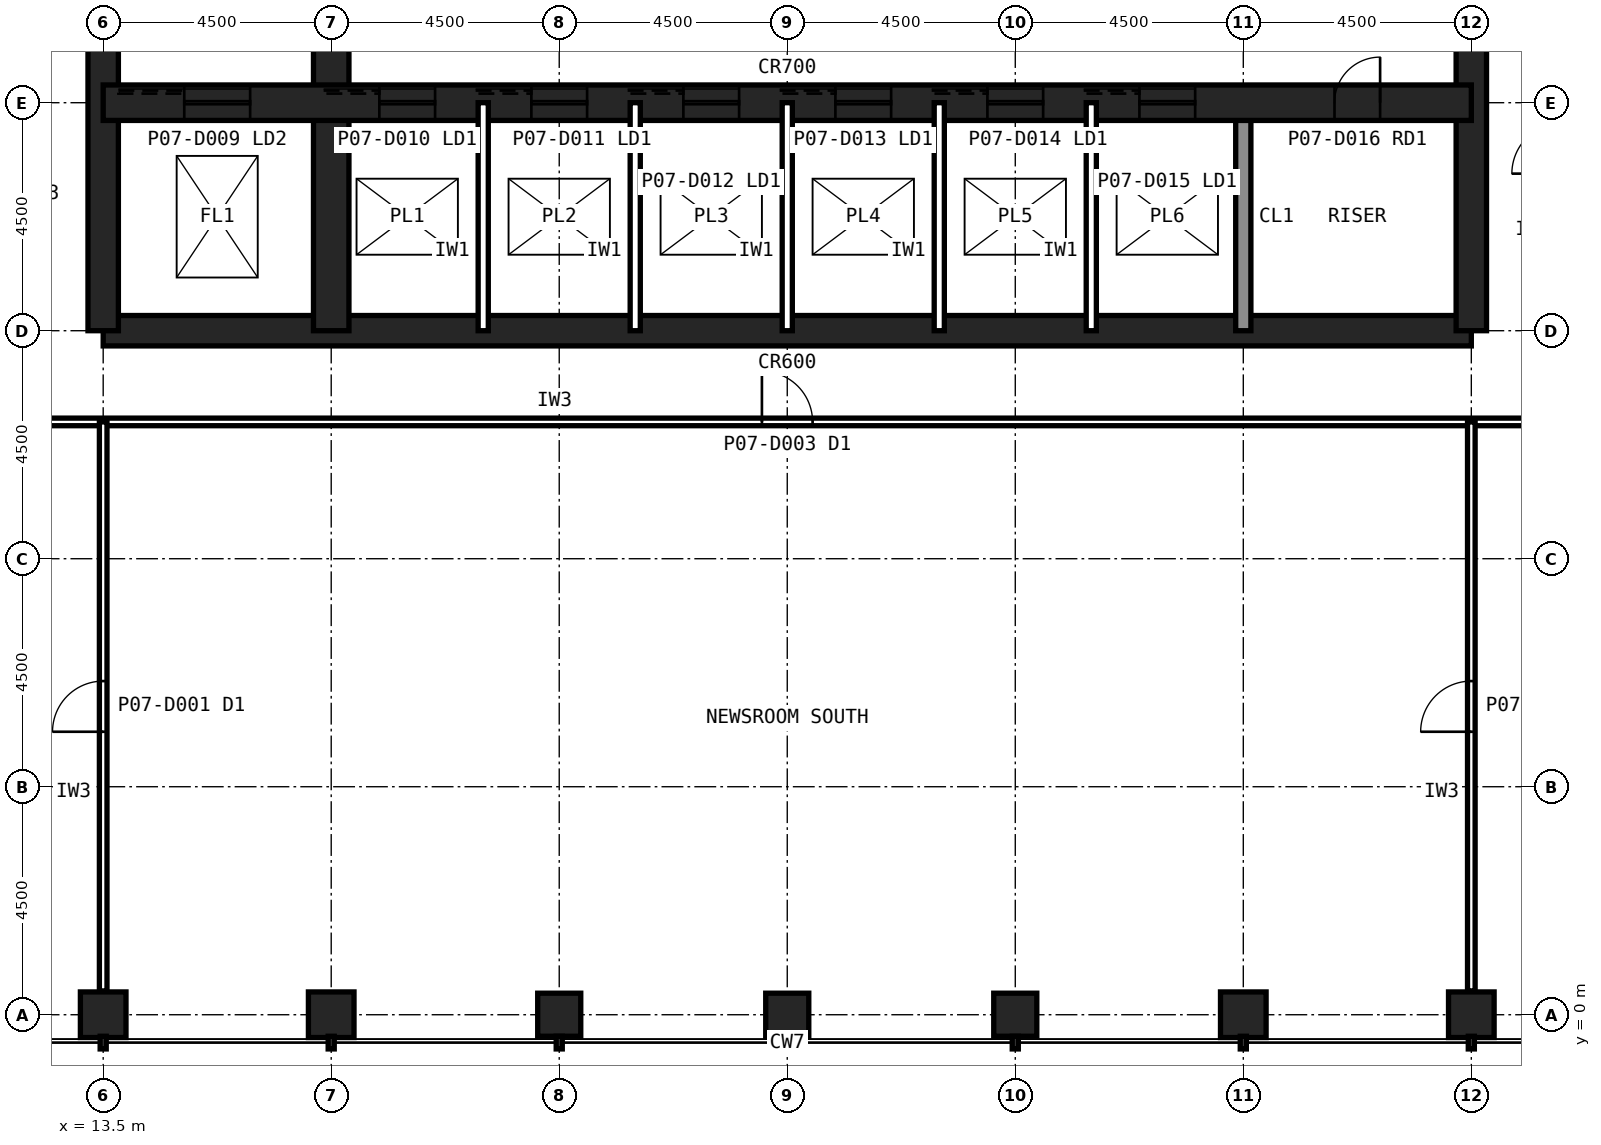
"""IFC4 building model, lengths in metres.
Left out: names, types, materials, properties, quantities, classifications, styles, units other than length and angle.
Written with IfcOpenShell. Run it as: python <this file> out.ifc"""

import sys

from ifc_helpers import new_model, si_unit, direction, frame, frame_2d, origin, origin_2d, place, context, subcontext, project, spatial, rectangle, hollow_rectangle, extrude, element, fill, save


model = new_model("IFC4")
c1 = context("Model", 3, precision=1e-05, world=origin(), true_north=direction((0.0, 1.0)))
c2 = subcontext(c1, "Body", "Model", "MODEL_VIEW")
j1 = project(units=[si_unit("LENGTHUNIT", "METRE"), si_unit("PLANEANGLEUNIT", "RADIAN")], contexts=[c1])
p1 = place(None, origin())
s1 = spatial("IfcSite", under=j1, at=p1, CompositionType="ELEMENT")
p2 = place(p1, origin())
s2 = spatial("IfcBuilding", under=s1, at=p2, CompositionType="ELEMENT")
p3 = place(p2, frame((0.0, 0.0, 33.2)))
s3 = spatial("IfcBuildingStorey", under=s2, at=p3, CompositionType="ELEMENT", Elevation=33.2)
for number, where, z_axis, x_axis in (
    (1, (13.5, 0.0, 0.0), (0.0, 0.0, 1.0), (1.0, 0.0, 0.0)),
    (2, (18.0, 0.0, 0.0), (0.0, 0.0, 1.0), (1.0, 0.0, 0.0)),
):
    element("IfcColumn", number, at=place(p3, frame(where, z_axis=z_axis, x_axis=x_axis)), inside=s3, PredefinedType="COLUMN", context=c2, shape_type="SweptSolid", body=[
        extrude(hollow_rectangle(XDim=0.9, YDim=0.9, WallThickness=0.063, at=origin_2d()), origin(), (0.0, 0.0, 1.0), 4.2),
    ])
for number, where, z_axis, x_axis in (
    (3, (22.5, 0.0, 0.0), (0.0, 0.0, 1.0), (1.0, 0.0, 0.0)),
    (4, (27.0, 0.0, 0.0), (0.0, 0.0, 1.0), (1.0, 0.0, 0.0)),
    (5, (31.5, 0.0, 0.0), (0.0, 0.0, 1.0), (1.0, 0.0, 0.0)),
):
    element("IfcColumn", number, at=place(p3, frame(where, z_axis=z_axis, x_axis=x_axis)), inside=s3, PredefinedType="COLUMN", context=c2, shape_type="SweptSolid", body=[
        extrude(hollow_rectangle(XDim=0.85, YDim=0.85, WallThickness=0.05, at=origin_2d()), origin(), (0.0, 0.0, 1.0), 4.2),
    ])
for number, where, z_axis, x_axis in (
    (6, (36.0, 0.0, 0.0), (0.0, 0.0, 1.0), (1.0, 0.0, 0.0)),
    (7, (40.5, 0.0, 0.0), (0.0, 0.0, 1.0), (1.0, 0.0, 0.0)),
):
    element("IfcColumn", number, at=place(p3, frame(where, z_axis=z_axis, x_axis=x_axis)), inside=s3, PredefinedType="COLUMN", context=c2, shape_type="SweptSolid", body=[
        extrude(hollow_rectangle(XDim=0.9, YDim=0.9, WallThickness=0.063, at=origin_2d()), origin(), (0.0, 0.0, 1.0), 4.2),
    ])
p4 = place(p3, frame((13.5, 13.5, 0.0), z_axis=(0.0, 0.0, 1.0), x_axis=(1.0, 0.0, 0.0)))
e8 = element("IfcWall", 8, at=p4, inside=s3, PredefinedType="SHEAR", context=c2, shape_type="SweptSolid", body=[
    extrude(rectangle(XDim=27.0, YDim=0.6, at=frame_2d((13.5, 0.0))), origin(), (0.0, 0.0, 1.0), 4.2),
])
p5 = place(p3, frame((40.5, 13.5, 0.0), z_axis=(0.0, 0.0, 1.0), x_axis=(0.0, 1.0, 0.0)))
e9 = element("IfcWall", 9, at=p5, inside=s3, PredefinedType="SHEAR", context=c2, shape_type="SweptSolid", body=[
    extrude(rectangle(XDim=27.0, YDim=0.6, at=frame_2d((13.5, 0.0))), origin(), (0.0, 0.0, 1.0), 4.2),
])
p6 = place(p5, frame((5.85, 0.0, 0.0)))
e10 = element("IfcOpeningElement", 10, at=p6, cuts=e9, PredefinedType="OPENING", context=c2, shape_type="SweptSolid", body=[
    extrude(rectangle(XDim=1.8, YDim=2.1, at=frame_2d((0.9, 1.05))), frame((0.0, 0.31, 0.0), z_axis=(0.0, -1.0, 0.0), x_axis=(1.0, 0.0, 0.0)), (0.0, 0.0, 1.0), 0.62),
])
p7 = place(p5, frame((19.65, 0.0, 0.0)))
e11 = element("IfcOpeningElement", 11, at=p7, cuts=e9, PredefinedType="OPENING", context=c2, shape_type="SweptSolid", body=[
    extrude(rectangle(XDim=1.2, YDim=2.1, at=frame_2d((0.6, 1.05))), frame((0.0, 0.31, 0.0), z_axis=(0.0, -1.0, 0.0), x_axis=(1.0, 0.0, 0.0)), (0.0, 0.0, 1.0), 0.62),
])
p8 = place(p3, frame((13.5, 40.5, 0.0), z_axis=(0.0, 0.0, 1.0), x_axis=(0.0, -1.0, 0.0)))
e12 = element("IfcWall", 12, at=p8, inside=s3, PredefinedType="SHEAR", context=c2, shape_type="SweptSolid", body=[
    extrude(rectangle(XDim=27.0, YDim=0.6, at=frame_2d((13.5, 0.0))), origin(), (0.0, 0.0, 1.0), 4.2),
])
p9 = place(p8, frame((19.65, 0.0, 0.0)))
e13 = element("IfcOpeningElement", 13, at=p9, cuts=e12, PredefinedType="OPENING", context=c2, shape_type="SweptSolid", body=[
    extrude(rectangle(XDim=1.2, YDim=2.1, at=frame_2d((0.6, 1.05))), frame((0.0, 0.31, 0.0), z_axis=(0.0, -1.0, 0.0), x_axis=(1.0, 0.0, 0.0)), (0.0, 0.0, 1.0), 0.62),
])
p10 = place(p8, frame((5.85, 0.0, 0.0)))
e14 = element("IfcOpeningElement", 14, at=p10, cuts=e12, PredefinedType="OPENING", context=c2, shape_type="SweptSolid", body=[
    extrude(rectangle(XDim=1.8, YDim=2.1, at=frame_2d((0.9, 1.05))), frame((0.0, 0.31, 0.0), z_axis=(0.0, -1.0, 0.0), x_axis=(1.0, 0.0, 0.0)), (0.0, 0.0, 1.0), 0.62),
])
p11 = place(p3, frame((18.0, 13.5, 0.0), z_axis=(0.0, 0.0, 1.0), x_axis=(0.0, 1.0, 0.0)))
e15 = element("IfcWall", 15, at=p11, inside=s3, PredefinedType="SHEAR", context=c2, shape_type="SweptSolid", body=[
    extrude(rectangle(XDim=18.0, YDim=0.7, at=frame_2d((9.0, 0.0))), origin(), (0.0, 0.0, 1.0), 4.2),
])
p12 = place(p3, frame((36.0, 13.5, 0.0), z_axis=(0.0, 0.0, 1.0), x_axis=(0.0, 1.0, 0.0)))
e16 = element("IfcWall", 16, at=p12, inside=s3, PredefinedType="SOLIDWALL", context=c2, shape_type="SweptSolid", body=[
    extrude(rectangle(XDim=4.5, YDim=0.3, at=frame_2d((2.25, 0.0))), origin(), (0.0, 0.0, 1.0), 4.04),
])
p13 = place(p3, frame((13.5, 18.0, 0.0), z_axis=(0.0, 0.0, 1.0), x_axis=(1.0, 0.0, 0.0)))
e17 = element("IfcWall", 17, at=p13, inside=s3, PredefinedType="SHEAR", context=c2, shape_type="SweptSolid", body=[
    extrude(rectangle(XDim=27.0, YDim=0.7, at=frame_2d((13.5, 0.0))), origin(), (0.0, 0.0, 1.0), 4.2),
])
p14 = place(p13, frame((24.3, 0.0, 0.0)))
e18 = element("IfcOpeningElement", 18, at=p14, cuts=e17, PredefinedType="OPENING", context=c2, shape_type="SweptSolid", body=[
    extrude(rectangle(XDim=0.9, YDim=2.1, at=frame_2d((0.45, 1.05))), frame((0.0, 0.36, 0.0), z_axis=(0.0, -1.0, 0.0), x_axis=(1.0, 0.0, 0.0)), (0.0, 0.0, 1.0), 0.72),
])
p15 = place(p13, frame((5.45, 0.0, 0.0)))
e19 = element("IfcOpeningElement", 19, at=p15, cuts=e17, PredefinedType="OPENING", context=c2, shape_type="SweptSolid", body=[
    extrude(rectangle(XDim=1.1, YDim=2.1, at=frame_2d((0.55, 1.05))), frame((0.0, 0.36, 0.0), z_axis=(0.0, -1.0, 0.0), x_axis=(1.0, 0.0, 0.0)), (0.0, 0.0, 1.0), 0.72),
])
p16 = place(p13, frame((8.45, 0.0, 0.0)))
e20 = element("IfcOpeningElement", 20, at=p16, cuts=e17, PredefinedType="OPENING", context=c2, shape_type="SweptSolid", body=[
    extrude(rectangle(XDim=1.1, YDim=2.1, at=frame_2d((0.55, 1.05))), frame((0.0, 0.36, 0.0), z_axis=(0.0, -1.0, 0.0), x_axis=(1.0, 0.0, 0.0)), (0.0, 0.0, 1.0), 0.72),
])
p17 = place(p13, frame((11.45, 0.0, 0.0)))
e21 = element("IfcOpeningElement", 21, at=p17, cuts=e17, PredefinedType="OPENING", context=c2, shape_type="SweptSolid", body=[
    extrude(rectangle(XDim=1.1, YDim=2.1, at=frame_2d((0.55, 1.05))), frame((0.0, 0.36, 0.0), z_axis=(0.0, -1.0, 0.0), x_axis=(1.0, 0.0, 0.0)), (0.0, 0.0, 1.0), 0.72),
])
p18 = place(p13, frame((14.45, 0.0, 0.0)))
e22 = element("IfcOpeningElement", 22, at=p18, cuts=e17, PredefinedType="OPENING", context=c2, shape_type="SweptSolid", body=[
    extrude(rectangle(XDim=1.1, YDim=2.1, at=frame_2d((0.55, 1.05))), frame((0.0, 0.36, 0.0), z_axis=(0.0, -1.0, 0.0), x_axis=(1.0, 0.0, 0.0)), (0.0, 0.0, 1.0), 0.72),
])
p19 = place(p13, frame((17.45, 0.0, 0.0)))
e23 = element("IfcOpeningElement", 23, at=p19, cuts=e17, PredefinedType="OPENING", context=c2, shape_type="SweptSolid", body=[
    extrude(rectangle(XDim=1.1, YDim=2.1, at=frame_2d((0.55, 1.05))), frame((0.0, 0.36, 0.0), z_axis=(0.0, -1.0, 0.0), x_axis=(1.0, 0.0, 0.0)), (0.0, 0.0, 1.0), 0.72),
])
p20 = place(p13, frame((20.45, 0.0, 0.0)))
e24 = element("IfcOpeningElement", 24, at=p20, cuts=e17, PredefinedType="OPENING", context=c2, shape_type="SweptSolid", body=[
    extrude(rectangle(XDim=1.1, YDim=2.1, at=frame_2d((0.55, 1.05))), frame((0.0, 0.36, 0.0), z_axis=(0.0, -1.0, 0.0), x_axis=(1.0, 0.0, 0.0)), (0.0, 0.0, 1.0), 0.72),
])
p21 = place(p13, frame((1.6, 0.0, 0.0)))
e25 = element("IfcOpeningElement", 25, at=p21, cuts=e17, PredefinedType="OPENING", context=c2, shape_type="SweptSolid", body=[
    extrude(rectangle(XDim=1.3, YDim=2.2, at=frame_2d((0.65, 1.1))), frame((0.0, 0.36, 0.0), z_axis=(0.0, -1.0, 0.0), x_axis=(1.0, 0.0, 0.0)), (0.0, 0.0, 1.0), 0.72),
])
for number, where, z_axis, x_axis in (
    (26, (21.0, 13.5, 0.0), (0.0, 0.0, 1.0), (0.0, 1.0, 0.0)),
    (27, (24.0, 13.5, 0.0), (0.0, 0.0, 1.0), (0.0, 1.0, 0.0)),
    (28, (27.0, 13.5, 0.0), (0.0, 0.0, 1.0), (0.0, 1.0, 0.0)),
    (29, (30.0, 13.5, 0.0), (0.0, 0.0, 1.0), (0.0, 1.0, 0.0)),
    (30, (33.0, 13.5, 0.0), (0.0, 0.0, 1.0), (0.0, 1.0, 0.0)),
):
    element("IfcWall", number, at=place(p3, frame(where, z_axis=z_axis, x_axis=x_axis)), inside=s3, PredefinedType="PARTITIONING", context=c2, shape_type="SweptSolid", body=[
        extrude(rectangle(XDim=4.5, YDim=0.2, at=frame_2d((2.25, 0.0))), origin(), (0.0, 0.0, 1.0), 4.04),
    ])
p22 = place(p3, frame((11.7, 11.7, 0.0), z_axis=(0.0, 0.0, 1.0), x_axis=(1.0, 0.0, 0.0)))
e31 = element("IfcWall", 31, at=p22, inside=s3, PredefinedType="PARTITIONING", context=c2, shape_type="SweptSolid", body=[
    extrude(rectangle(XDim=30.6, YDim=0.15, at=frame_2d((15.3, 0.0))), origin(), (0.0, 0.0, 1.0), 4.04),
])
p23 = place(p22, frame((14.8, 0.0, 0.0)))
e32 = element("IfcOpeningElement", 32, at=p23, cuts=e31, PredefinedType="OPENING", context=c2, shape_type="SweptSolid", body=[
    extrude(rectangle(XDim=1.0, YDim=2.1, at=frame_2d((0.5, 1.05))), frame((0.0, 0.085, 0.0), z_axis=(0.0, -1.0, 0.0), x_axis=(1.0, 0.0, 0.0)), (0.0, 0.0, 1.0), 0.17),
])
p24 = place(p3, frame((40.5, 0.47, 0.0), z_axis=(0.0, 0.0, 1.0), x_axis=(0.0, 1.0, 0.0)))
e33 = element("IfcWall", 33, at=p24, inside=s3, PredefinedType="PARTITIONING", context=c2, shape_type="SweptSolid", body=[
    extrude(rectangle(XDim=11.23, YDim=0.15, at=frame_2d((5.615, 0.0))), origin(), (0.0, 0.0, 1.0), 3.189),
])
p25 = place(p24, frame((5.115, 0.0, 0.0)))
e34 = element("IfcOpeningElement", 34, at=p25, cuts=e33, PredefinedType="OPENING", context=c2, shape_type="SweptSolid", body=[
    extrude(rectangle(XDim=1.0, YDim=2.1, at=frame_2d((0.5, 1.05))), frame((0.0, 0.085, 0.0), z_axis=(0.0, -1.0, 0.0), x_axis=(1.0, 0.0, 0.0)), (0.0, 0.0, 1.0), 0.17),
])
p26 = place(p3, frame((13.5, 0.47, 0.0), z_axis=(0.0, 0.0, 1.0), x_axis=(0.0, 1.0, 0.0)))
e35 = element("IfcWall", 35, at=p26, inside=s3, PredefinedType="PARTITIONING", context=c2, shape_type="SweptSolid", body=[
    extrude(rectangle(XDim=11.23, YDim=0.15, at=frame_2d((5.615, 0.0))), origin(), (0.0, 0.0, 1.0), 3.189),
])
p27 = place(p26, frame((5.115, 0.0, 0.0)))
e36 = element("IfcOpeningElement", 36, at=p27, cuts=e35, PredefinedType="OPENING", context=c2, shape_type="SweptSolid", body=[
    extrude(rectangle(XDim=1.0, YDim=2.1, at=frame_2d((0.5, 1.05))), frame((0.0, 0.085, 0.0), z_axis=(0.0, -1.0, 0.0), x_axis=(1.0, 0.0, 0.0)), (0.0, 0.0, 1.0), 0.17),
])
p28 = place(p14, origin())
e37 = element("IfcDoor", 37, at=p28, inside=s3, OperationType="SINGLE_SWING_RIGHT", PredefinedType="DOOR", context=c2, shape_type="SweptSolid", body=[
    extrude(rectangle(XDim=0.9, YDim=2.1, at=frame_2d((0.45, 1.05))), frame((0.0, 0.025, 0.0), z_axis=(0.0, -1.0, 0.0), x_axis=(1.0, 0.0, 0.0)), (0.0, 0.0, 1.0), 0.05),
])
fill(e18, e37)
p29 = place(p15, origin())
e38 = element("IfcDoor", 38, at=p29, inside=s3, OperationType="SLIDING_TO_LEFT", PredefinedType="DOOR", context=c2, shape_type="SweptSolid", body=[
    extrude(rectangle(XDim=1.1, YDim=2.1, at=frame_2d((0.55, 1.05))), frame((0.0, 0.025, 0.0), z_axis=(0.0, -1.0, 0.0), x_axis=(1.0, 0.0, 0.0)), (0.0, 0.0, 1.0), 0.05),
])
fill(e19, e38)
p30 = place(p16, origin())
e39 = element("IfcDoor", 39, at=p30, inside=s3, OperationType="SLIDING_TO_LEFT", PredefinedType="DOOR", context=c2, shape_type="SweptSolid", body=[
    extrude(rectangle(XDim=1.1, YDim=2.1, at=frame_2d((0.55, 1.05))), frame((0.0, 0.025, 0.0), z_axis=(0.0, -1.0, 0.0), x_axis=(1.0, 0.0, 0.0)), (0.0, 0.0, 1.0), 0.05),
])
fill(e20, e39)
p31 = place(p17, origin())
e40 = element("IfcDoor", 40, at=p31, inside=s3, OperationType="SLIDING_TO_LEFT", PredefinedType="DOOR", context=c2, shape_type="SweptSolid", body=[
    extrude(rectangle(XDim=1.1, YDim=2.1, at=frame_2d((0.55, 1.05))), frame((0.0, 0.025, 0.0), z_axis=(0.0, -1.0, 0.0), x_axis=(1.0, 0.0, 0.0)), (0.0, 0.0, 1.0), 0.05),
])
fill(e21, e40)
p32 = place(p18, origin())
e41 = element("IfcDoor", 41, at=p32, inside=s3, OperationType="SLIDING_TO_LEFT", PredefinedType="DOOR", context=c2, shape_type="SweptSolid", body=[
    extrude(rectangle(XDim=1.1, YDim=2.1, at=frame_2d((0.55, 1.05))), frame((0.0, 0.025, 0.0), z_axis=(0.0, -1.0, 0.0), x_axis=(1.0, 0.0, 0.0)), (0.0, 0.0, 1.0), 0.05),
])
fill(e22, e41)
p33 = place(p19, origin())
e42 = element("IfcDoor", 42, at=p33, inside=s3, OperationType="SLIDING_TO_LEFT", PredefinedType="DOOR", context=c2, shape_type="SweptSolid", body=[
    extrude(rectangle(XDim=1.1, YDim=2.1, at=frame_2d((0.55, 1.05))), frame((0.0, 0.025, 0.0), z_axis=(0.0, -1.0, 0.0), x_axis=(1.0, 0.0, 0.0)), (0.0, 0.0, 1.0), 0.05),
])
fill(e23, e42)
p34 = place(p20, origin())
e43 = element("IfcDoor", 43, at=p34, inside=s3, OperationType="SLIDING_TO_LEFT", PredefinedType="DOOR", context=c2, shape_type="SweptSolid", body=[
    extrude(rectangle(XDim=1.1, YDim=2.1, at=frame_2d((0.55, 1.05))), frame((0.0, 0.025, 0.0), z_axis=(0.0, -1.0, 0.0), x_axis=(1.0, 0.0, 0.0)), (0.0, 0.0, 1.0), 0.05),
])
fill(e24, e43)
p35 = place(p21, origin())
e44 = element("IfcDoor", 44, at=p35, inside=s3, OperationType="SLIDING_TO_LEFT", PredefinedType="DOOR", context=c2, shape_type="SweptSolid", body=[
    extrude(rectangle(XDim=1.3, YDim=2.2, at=frame_2d((0.65, 1.1))), frame((0.0, 0.025, 0.0), z_axis=(0.0, -1.0, 0.0), x_axis=(1.0, 0.0, 0.0)), (0.0, 0.0, 1.0), 0.05),
])
fill(e25, e44)
p36 = place(p23, origin())
e45 = element("IfcDoor", 45, at=p36, inside=s3, OperationType="SINGLE_SWING_LEFT", PredefinedType="DOOR", context=c2, shape_type="SweptSolid", body=[
    extrude(rectangle(XDim=1.0, YDim=2.1, at=frame_2d((0.5, 1.05))), frame((0.0, 0.025, 0.0), z_axis=(0.0, -1.0, 0.0), x_axis=(1.0, 0.0, 0.0)), (0.0, 0.0, 1.0), 0.05),
])
fill(e32, e45)
p37 = place(p25, origin())
e46 = element("IfcDoor", 46, at=p37, inside=s3, OperationType="SINGLE_SWING_LEFT", PredefinedType="DOOR", context=c2, shape_type="SweptSolid", body=[
    extrude(rectangle(XDim=1.0, YDim=2.1, at=frame_2d((0.5, 1.05))), frame((0.0, 0.025, 0.0), z_axis=(0.0, -1.0, 0.0), x_axis=(1.0, 0.0, 0.0)), (0.0, 0.0, 1.0), 0.05),
])
fill(e34, e46)
p38 = place(p27, origin())
e47 = element("IfcDoor", 47, at=p38, inside=s3, OperationType="SINGLE_SWING_LEFT", PredefinedType="DOOR", context=c2, shape_type="SweptSolid", body=[
    extrude(rectangle(XDim=1.0, YDim=2.1, at=frame_2d((0.5, 1.05))), frame((0.0, 0.025, 0.0), z_axis=(0.0, -1.0, 0.0), x_axis=(1.0, 0.0, 0.0)), (0.0, 0.0, 1.0), 0.05),
])
fill(e36, e47)
save(model, sys.argv[1])
